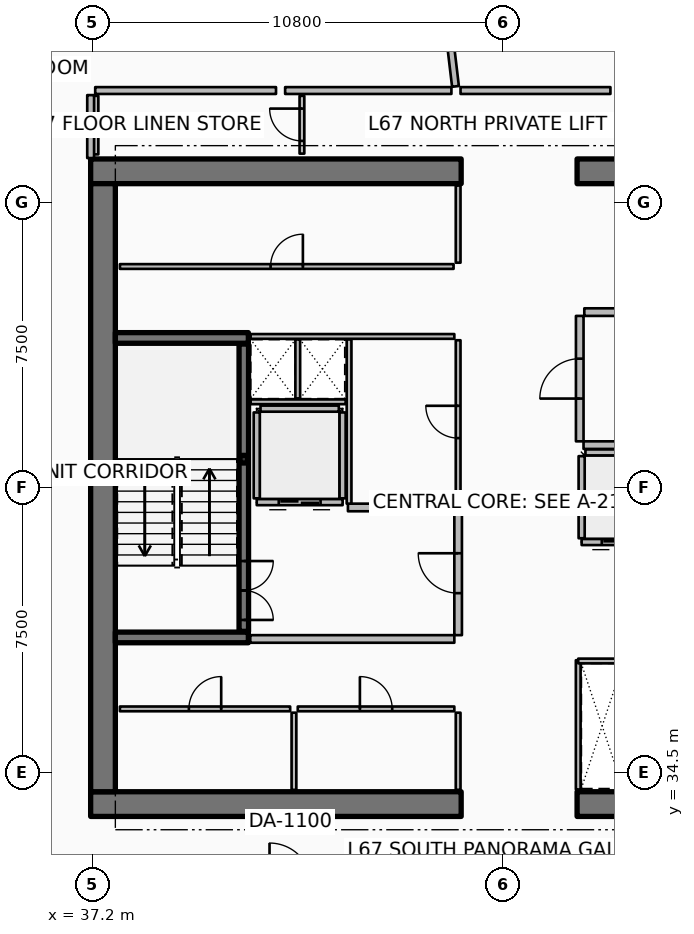
"""IFC4 building model, lengths in metres.
Left out: names, types, materials, properties, quantities, classifications, styles, units other than length and angle.
Written with IfcOpenShell. Run it as: python <this file> out.ifc"""

import sys

from ifc_helpers import new_model, si_unit, direction, frame, frame_2d, origin, origin_2d, place, context, subcontext, project, spatial, rectangle, hollow_rectangle, extrude, element, fill, save


model = new_model("IFC4")
c1 = context("Model", 3, precision=1e-05, world=origin(), true_north=direction((0.0, 1.0)))
c2 = subcontext(c1, "Body", "Model", "MODEL_VIEW")
j1 = project(units=[si_unit("LENGTHUNIT", "METRE"), si_unit("PLANEANGLEUNIT", "RADIAN")], contexts=[c1])
p1 = place(None, origin())
s1 = spatial("IfcSite", under=j1, at=p1, CompositionType="ELEMENT")
p2 = place(p1, origin())
s2 = spatial("IfcBuilding", under=s1, at=p2, CompositionType="ELEMENT")
p3 = place(p2, frame((0.0, 0.0, 267.5)))
s3 = spatial("IfcBuildingStorey", under=s2, at=p3, CompositionType="ELEMENT", Elevation=267.5)
for number, where, z_axis, x_axis in (
    (1, (37.15, 33.675, 0.0), (0.0, 0.0, 1.0), (1.0, 0.0, 0.0)),
    (2, (49.95, 33.675, 0.0), (0.0, 0.0, 1.0), (1.0, 0.0, 0.0)),
    (3, (37.15, 50.325, 0.0), (0.0, 0.0, 1.0), (1.0, 0.0, 0.0)),
    (4, (49.95, 50.325, 0.0), (0.0, 0.0, 1.0), (1.0, 0.0, 0.0)),
):
    element("IfcWall", number, at=place(p3, frame(where, z_axis=z_axis, x_axis=x_axis)), inside=s3, PredefinedType="SHEAR", context=c2, shape_type="SweptSolid", body=[
        extrude(rectangle(XDim=9.75, YDim=0.65, at=frame_2d((4.875, 0.0))), origin(), (0.0, 0.0, 1.0), 3.85),
    ])
p4 = place(p3, frame((37.475, 34.0, 0.0), z_axis=(0.0, 0.0, 1.0), x_axis=(0.0, 1.0, 0.0)))
e5 = element("IfcWall", 5, at=p4, inside=s3, PredefinedType="SHEAR", context=c2, shape_type="SweptSolid", body=[
    extrude(rectangle(XDim=16.0, YDim=0.65, at=frame_2d((8.0, 0.0))), origin(), (0.0, 0.0, 1.0), 3.85),
])
for number, where, z_axis, x_axis in (
    (6, (37.8, 38.06, 0.0), (0.0, 0.0, 1.0), (1.0, 0.0, 0.0)),
    (7, (37.8, 45.94, 0.0), (0.0, 0.0, 1.0), (1.0, 0.0, 0.0)),
):
    element("IfcWall", number, at=place(p3, frame(where, z_axis=z_axis, x_axis=x_axis)), inside=s3, PredefinedType="SHEAR", context=c2, shape_type="SweptSolid", body=[
        extrude(rectangle(XDim=3.5, YDim=0.28, at=frame_2d((1.75, 0.0))), origin(), (0.0, 0.0, 1.0), 3.85),
    ])
p5 = place(p3, frame((41.18, 42.75, 0.0), z_axis=(0.0, 0.0, 1.0), x_axis=(1.0, 0.0, 0.0)))
e8 = element("IfcColumn", 8, at=p5, inside=s3, PredefinedType="COLUMN", context=c2, shape_type="SweptSolid", body=[
    extrude(hollow_rectangle(XDim=0.2, YDim=0.2, WallThickness=0.01, InnerFilletRadius=0.01, OuterFilletRadius=0.02, at=origin_2d()), origin(), (0.0, 0.0, 1.0), 1.72),
])
p6 = place(p3, frame((41.18, 38.22, 0.0), z_axis=(0.0, 0.0, 1.0), x_axis=(0.0, 1.0, 0.0)))
e9 = element("IfcWall", 9, at=p6, inside=s3, PredefinedType="SOLIDWALL", context=c2, shape_type="SweptSolid", body=[
    extrude(rectangle(XDim=7.56, YDim=0.25, at=frame_2d((3.78, 0.0))), origin(), (0.0, 0.0, 1.0), 3.59),
])
p7 = place(p6, frame((0.3, 0.0, 0.0)))
e10 = element("IfcOpeningElement", 10, at=p7, cuts=e9, PredefinedType="OPENING", context=c2, shape_type="SweptSolid", body=[
    extrude(rectangle(XDim=1.55, YDim=2.15, at=frame_2d((0.775, 1.075))), frame((0.0, 0.135, 0.0), z_axis=(0.0, -1.0, 0.0), x_axis=(1.0, 0.0, 0.0)), (0.0, 0.0, 1.0), 0.27),
])
p8 = place(p3, frame((43.78, 41.62, 0.0), z_axis=(0.0, 0.0, 1.0), x_axis=(-1.0, 0.0, 0.0)))
e11 = element("IfcWall", 11, at=p8, inside=s3, PredefinedType="PARTITIONING", context=c2, shape_type="SweptSolid", body=[
    extrude(rectangle(XDim=2.26, YDim=0.16, at=frame_2d((1.13, 0.0))), origin(), (0.0, 0.0, 1.0), 3.59),
])
p9 = place(p8, frame((0.58, 0.0, 0.0)))
e12 = element("IfcOpeningElement", 12, at=p9, cuts=e11, PredefinedType="OPENING", context=c2, shape_type="SweptSolid", body=[
    extrude(rectangle(XDim=1.1, YDim=2.1, at=frame_2d((0.55, 1.05))), frame((0.0, 0.09, 0.0), z_axis=(0.0, -1.0, 0.0), x_axis=(1.0, 0.0, 0.0)), (0.0, 0.0, 1.0), 0.18),
])
for number, where, z_axis, x_axis in (
    (13, (43.78, 41.72, 0.0), (0.0, 0.0, 1.0), (0.0, 1.0, 0.0)),
    (14, (41.52, 41.72, 0.0), (0.0, 0.0, 1.0), (0.0, 1.0, 0.0)),
):
    element("IfcWall", number, at=place(p3, frame(where, z_axis=z_axis, x_axis=x_axis)), inside=s3, PredefinedType="PARTITIONING", context=c2, shape_type="SweptSolid", body=[
        extrude(rectangle(XDim=2.26, YDim=0.16, at=frame_2d((1.13, 0.0))), origin(), (0.0, 0.0, 1.0), 3.59),
    ])
p10 = place(p3, frame((41.62, 44.08, 0.0), z_axis=(0.0, 0.0, 1.0), x_axis=(1.0, 0.0, 0.0)))
e15 = element("IfcWall", 15, at=p10, inside=s3, PredefinedType="PARTITIONING", context=c2, shape_type="SweptSolid", body=[
    extrude(rectangle(XDim=2.06, YDim=0.16, at=frame_2d((1.03, 0.0))), origin(), (0.0, 0.0, 1.0), 3.59),
])
p11 = place(p3, frame((52.23, 40.57, 0.0), z_axis=(0.0, 0.0, 1.0), x_axis=(-1.0, 0.0, 0.0)))
e16 = element("IfcWall", 16, at=p11, inside=s3, PredefinedType="PARTITIONING", context=c2, shape_type="SweptSolid", body=[
    extrude(rectangle(XDim=2.16, YDim=0.16, at=frame_2d((1.08, 0.0))), origin(), (0.0, 0.0, 1.0), 3.59),
])
p12 = place(p11, frame((0.53, 0.0, 0.0)))
e17 = element("IfcOpeningElement", 17, at=p12, cuts=e16, PredefinedType="OPENING", context=c2, shape_type="SweptSolid", body=[
    extrude(rectangle(XDim=1.1, YDim=2.1, at=frame_2d((0.55, 1.05))), frame((0.0, 0.09, 0.0), z_axis=(0.0, -1.0, 0.0), x_axis=(1.0, 0.0, 0.0)), (0.0, 0.0, 1.0), 0.18),
])
p13 = place(p3, frame((50.07, 40.67, 0.0), z_axis=(0.0, 0.0, 1.0), x_axis=(0.0, 1.0, 0.0)))
e18 = element("IfcWall", 18, at=p13, inside=s3, PredefinedType="PARTITIONING", context=c2, shape_type="SweptSolid", body=[
    extrude(rectangle(XDim=2.16, YDim=0.16, at=frame_2d((1.08, 0.0))), origin(), (0.0, 0.0, 1.0), 3.59),
])
p14 = place(p3, frame((50.17, 42.93, 0.0), z_axis=(0.0, 0.0, 1.0), x_axis=(1.0, 0.0, 0.0)))
e19 = element("IfcWall", 19, at=p14, inside=s3, PredefinedType="PARTITIONING", context=c2, shape_type="SweptSolid", body=[
    extrude(rectangle(XDim=1.96, YDim=0.16, at=frame_2d((0.98, 0.0))), origin(), (0.0, 0.0, 1.0), 3.59),
])
for number, where, z_axis, x_axis in (
    (20, (46.82, 34.05, 0.0), (0.0, 0.0, 1.0), (0.0, 1.0, 0.0)),
    (21, (42.5, 34.05, 0.0), (0.0, 0.0, 1.0), (0.0, 1.0, 0.0)),
):
    element("IfcWall", number, at=place(p3, frame(where, z_axis=z_axis, x_axis=x_axis)), inside=s3, PredefinedType="PARTITIONING", context=c2, shape_type="SweptSolid", body=[
        extrude(rectangle(XDim=2.03, YDim=0.125, at=frame_2d((1.015, 0.0))), origin(), (0.0, 0.0, 1.0), 3.03),
    ])
p15 = place(p3, frame((37.92, 36.18, 0.0), z_axis=(0.0, 0.0, 1.0), x_axis=(1.0, 0.0, 0.0)))
e22 = element("IfcWall", 22, at=p15, inside=s3, PredefinedType="PARTITIONING", context=c2, shape_type="SweptSolid", body=[
    extrude(rectangle(XDim=4.48, YDim=0.125, at=frame_2d((2.24, 0.0))), origin(), (0.0, 0.0, 1.0), 3.03),
])
p16 = place(p15, frame((1.815, 0.0, 0.0)))
e23 = element("IfcOpeningElement", 23, at=p16, cuts=e22, PredefinedType="OPENING", context=c2, shape_type="SweptSolid", body=[
    extrude(rectangle(XDim=0.85, YDim=2.06, at=frame_2d((0.425, 1.03))), frame((0.0, 0.073, 0.0), z_axis=(0.0, -1.0, 0.0), x_axis=(1.0, 0.0, 0.0)), (0.0, 0.0, 1.0), 0.145),
])
p17 = place(p3, frame((42.6, 36.18, 0.0), z_axis=(0.0, 0.0, 1.0), x_axis=(1.0, 0.0, 0.0)))
e24 = element("IfcWall", 24, at=p17, inside=s3, PredefinedType="PARTITIONING", context=c2, shape_type="SweptSolid", body=[
    extrude(rectangle(XDim=4.12, YDim=0.125, at=frame_2d((2.06, 0.0))), origin(), (0.0, 0.0, 1.0), 3.03),
])
p18 = place(p17, frame((1.635, 0.0, 0.0)))
e25 = element("IfcOpeningElement", 25, at=p18, cuts=e24, PredefinedType="OPENING", context=c2, shape_type="SweptSolid", body=[
    extrude(rectangle(XDim=0.85, YDim=2.06, at=frame_2d((0.425, 1.03))), frame((0.0, 0.073, 0.0), z_axis=(0.0, -1.0, 0.0), x_axis=(1.0, 0.0, 0.0)), (0.0, 0.0, 1.0), 0.145),
])
p19 = place(p3, frame((46.82, 47.92, 0.0), z_axis=(0.0, 0.0, 1.0), x_axis=(0.0, 1.0, 0.0)))
e26 = element("IfcWall", 26, at=p19, inside=s3, PredefinedType="PARTITIONING", context=c2, shape_type="SweptSolid", body=[
    extrude(rectangle(XDim=2.03, YDim=0.125, at=frame_2d((1.015, 0.0))), origin(), (0.0, 0.0, 1.0), 3.03),
])
p20 = place(p3, frame((37.92, 47.82, 0.0), z_axis=(0.0, 0.0, 1.0), x_axis=(1.0, 0.0, 0.0)))
e27 = element("IfcWall", 27, at=p20, inside=s3, PredefinedType="PARTITIONING", context=c2, shape_type="SweptSolid", body=[
    extrude(rectangle(XDim=8.78, YDim=0.125, at=frame_2d((4.39, 0.0))), origin(), (0.0, 0.0, 1.0), 3.03),
])
p21 = place(p20, frame((3.965, 0.0, 0.0)))
e28 = element("IfcOpeningElement", 28, at=p21, cuts=e27, PredefinedType="OPENING", context=c2, shape_type="SweptSolid", body=[
    extrude(rectangle(XDim=0.85, YDim=2.06, at=frame_2d((0.425, 1.03))), frame((0.0, 0.073, 0.0), z_axis=(0.0, -1.0, 0.0), x_axis=(1.0, 0.0, 0.0)), (0.0, 0.0, 1.0), 0.145),
])
p22 = place(p3, frame((41.35, 38.02, 0.0), z_axis=(0.0, 0.0, 1.0), x_axis=(1.0, 0.0, 0.0)))
e29 = element("IfcWall", 29, at=p22, inside=s3, PredefinedType="PARTITIONING", context=c2, shape_type="SweptSolid", body=[
    extrude(rectangle(XDim=5.37, YDim=0.2, at=frame_2d((2.685, 0.0))), origin(), (0.0, 0.0, 1.0), 3.59),
])
p23 = place(p3, frame((43.92, 41.48, 0.0), z_axis=(0.0, 0.0, 1.0), x_axis=(1.0, 0.0, 0.0)))
e30 = element("IfcWall", 30, at=p23, inside=s3, PredefinedType="PARTITIONING", context=c2, shape_type="SweptSolid", body=[
    extrude(rectangle(XDim=2.8, YDim=0.2, at=frame_2d((1.4, 0.0))), origin(), (0.0, 0.0, 1.0), 3.59),
])
p24 = place(p3, frame((46.82, 38.12, 0.0), z_axis=(0.0, 0.0, 1.0), x_axis=(0.0, 1.0, 0.0)))
e31 = element("IfcWall", 31, at=p24, inside=s3, PredefinedType="PARTITIONING", context=c2, shape_type="SweptSolid", body=[
    extrude(rectangle(XDim=3.26, YDim=0.2, at=frame_2d((1.63, 0.0))), origin(), (0.0, 0.0, 1.0), 3.59),
])
p25 = place(p24, frame((1.105, 0.0, 0.0)))
e32 = element("IfcOpeningElement", 32, at=p25, cuts=e31, PredefinedType="OPENING", context=c2, shape_type="SweptSolid", body=[
    extrude(rectangle(XDim=1.05, YDim=2.1, at=frame_2d((0.525, 1.05))), frame((0.0, 0.11, 0.0), z_axis=(0.0, -1.0, 0.0), x_axis=(1.0, 0.0, 0.0)), (0.0, 0.0, 1.0), 0.22),
])
p26 = place(p3, frame((50.12, 43.12, 0.0), z_axis=(0.0, 0.0, 1.0), x_axis=(1.0, 0.0, 0.0)))
e33 = element("IfcWall", 33, at=p26, inside=s3, PredefinedType="PARTITIONING", context=c2, shape_type="SweptSolid", body=[
    extrude(rectangle(XDim=8.88, YDim=0.2, at=frame_2d((4.44, 0.0))), origin(), (0.0, 0.0, 1.0), 3.59),
])
p27 = place(p3, frame((50.14, 46.62, 0.0), z_axis=(0.0, 0.0, 1.0), x_axis=(1.0, 0.0, 0.0)))
e34 = element("IfcWall", 34, at=p27, inside=s3, PredefinedType="PARTITIONING", context=c2, shape_type="SweptSolid", body=[
    extrude(rectangle(XDim=1.02, YDim=0.2, at=frame_2d((0.51, 0.0))), origin(), (0.0, 0.0, 1.0), 3.59),
])
p28 = place(p3, frame((50.02, 43.22, 0.0), z_axis=(0.0, 0.0, 1.0), x_axis=(0.0, 1.0, 0.0)))
e35 = element("IfcWall", 35, at=p28, inside=s3, PredefinedType="PARTITIONING", context=c2, shape_type="SweptSolid", body=[
    extrude(rectangle(XDim=3.3, YDim=0.2, at=frame_2d((1.65, 0.0))), origin(), (0.0, 0.0, 1.0), 3.59),
])
p29 = place(p28, frame((1.125, 0.0, 0.0)))
e36 = element("IfcOpeningElement", 36, at=p29, cuts=e35, PredefinedType="OPENING", context=c2, shape_type="SweptSolid", body=[
    extrude(rectangle(XDim=1.05, YDim=2.1, at=frame_2d((0.525, 1.05))), frame((0.0, 0.11, 0.0), z_axis=(0.0, -1.0, 0.0), x_axis=(1.0, 0.0, 0.0)), (0.0, 0.0, 1.0), 0.22),
])
p30 = place(p3, frame((41.36, 45.98, 0.0), z_axis=(0.0, 0.0, 1.0), x_axis=(1.0, 0.0, 0.0)))
e37 = element("IfcWall", 37, at=p30, inside=s3, PredefinedType="PARTITIONING", context=c2, shape_type="SweptSolid", body=[
    extrude(rectangle(XDim=5.36, YDim=0.125, at=frame_2d((2.68, 0.0))), origin(), (0.0, 0.0, 1.0), 3.03),
])
p31 = place(p3, frame((41.36, 44.26, 0.0), z_axis=(0.0, 0.0, 1.0), x_axis=(1.0, 0.0, 0.0)))
e38 = element("IfcWall", 38, at=p31, inside=s3, PredefinedType="PARTITIONING", context=c2, shape_type="SweptSolid", body=[
    extrude(rectangle(XDim=2.5, YDim=0.125, at=frame_2d((1.25, 0.0))), origin(), (0.0, 0.0, 1.0), 3.03),
])
p32 = place(p3, frame((42.6, 44.35, 0.0), z_axis=(0.0, 0.0, 1.0), x_axis=(0.0, 1.0, 0.0)))
e39 = element("IfcWall", 39, at=p32, inside=s3, PredefinedType="PARTITIONING", context=c2, shape_type="SweptSolid", body=[
    extrude(rectangle(XDim=1.55, YDim=0.125, at=frame_2d((0.775, 0.0))), origin(), (0.0, 0.0, 1.0), 3.03),
])
p33 = place(p3, frame((49.98, 34.06, 0.0), z_axis=(0.0, 0.0, 1.0), x_axis=(0.0, 1.0, 0.0)))
e40 = element("IfcWall", 40, at=p33, inside=s3, PredefinedType="PARTITIONING", context=c2, shape_type="SweptSolid", body=[
    extrude(rectangle(XDim=3.4, YDim=0.125, at=frame_2d((1.7, 0.0))), origin(), (0.0, 0.0, 1.0), 3.03),
])
p34 = place(p3, frame((49.98, 37.44, 0.0), z_axis=(0.0, 0.0, 1.0), x_axis=(1.0, 0.0, 0.0)))
e41 = element("IfcWall", 41, at=p34, inside=s3, PredefinedType="PARTITIONING", context=c2, shape_type="SweptSolid", body=[
    extrude(rectangle(XDim=1.26, YDim=0.125, at=frame_2d((0.63, 0.0))), origin(), (0.0, 0.0, 1.0), 3.03),
])
p35 = place(p3, frame((43.95, 41.58, 0.0), z_axis=(0.0, 0.0, 1.0), x_axis=(0.0, 1.0, 0.0)))
e42 = element("IfcWall", 42, at=p35, inside=s3, PredefinedType="PARTITIONING", context=c2, shape_type="SweptSolid", body=[
    extrude(rectangle(XDim=4.32, YDim=0.125, at=frame_2d((2.16, 0.0))), origin(), (0.0, 0.0, 1.0), 3.03),
])
p36 = place(p3, frame((46.82, 41.58, 0.0), z_axis=(0.0, 0.0, 1.0), x_axis=(0.0, 1.0, 0.0)))
e43 = element("IfcWall", 43, at=p36, inside=s3, PredefinedType="PARTITIONING", context=c2, shape_type="SweptSolid", body=[
    extrude(rectangle(XDim=4.3, YDim=0.125, at=frame_2d((2.15, 0.0))), origin(), (0.0, 0.0, 1.0), 3.03),
])
p37 = place(p36, frame((1.725, 0.0, 0.0)))
e44 = element("IfcOpeningElement", 44, at=p37, cuts=e43, PredefinedType="OPENING", context=c2, shape_type="SweptSolid", body=[
    extrude(rectangle(XDim=0.85, YDim=2.06, at=frame_2d((0.425, 1.03))), frame((0.0, 0.073, 0.0), z_axis=(0.0, -1.0, 0.0), x_axis=(1.0, 0.0, 0.0)), (0.0, 0.0, 1.0), 0.145),
])
p38 = place(p3, frame((37.29, 50.77, 0.0), z_axis=(0.0, 0.0, 1.0), x_axis=(0.0, 1.0, 0.0)))
e45 = element("IfcWall", 45, at=p38, inside=s3, PredefinedType="PARTITIONING", context=c2, shape_type="SweptSolid", body=[
    extrude(rectangle(XDim=1.54, YDim=0.125, at=frame_2d((0.77, 0.0))), origin(), (0.0, 0.0, 1.0), 3.03),
])
p39 = place(p3, frame((42.71, 50.79, 0.0), z_axis=(0.0, 0.0, 1.0), x_axis=(0.0, 1.0, 0.0)))
e46 = element("IfcWall", 46, at=p39, inside=s3, PredefinedType="PARTITIONING", context=c2, shape_type="SweptSolid", body=[
    extrude(rectangle(XDim=1.52, YDim=0.125, at=frame_2d((0.76, 0.0))), origin(), (0.0, 0.0, 1.0), 2.957),
])
p40 = place(p39, frame((0.335, 0.0, 0.0)))
e47 = element("IfcOpeningElement", 47, at=p40, cuts=e46, PredefinedType="OPENING", context=c2, shape_type="SweptSolid", body=[
    extrude(rectangle(XDim=0.85, YDim=2.06, at=frame_2d((0.425, 1.03))), frame((0.0, 0.073, 0.0), z_axis=(0.0, -1.0, 0.0), x_axis=(1.0, 0.0, 0.0)), (0.0, 0.0, 1.0), 0.145),
])
p41 = place(p3, frame((46.75, 52.559, 0.0), z_axis=(0.0, 0.0, 1.0), x_axis=(-0.117540318076, 0.993068111273, 0.0)))
e48 = element("IfcWall", 48, at=p41, inside=s3, PredefinedType="PARTITIONING", context=c2, shape_type="SweptSolid", body=[
    extrude(rectangle(XDim=14.062, YDim=0.18, at=frame_2d((7.031, 0.0))), origin(), (0.0, 0.0, 1.0), 2.957),
])
p42 = place(p3, frame((46.643, 52.45, 0.0), z_axis=(0.0, 0.0, 1.0), x_axis=(-1.0, 0.0, 0.0)))
e49 = element("IfcWall", 49, at=p42, inside=s3, PredefinedType="PARTITIONING", context=c2, shape_type="SweptSolid", body=[
    extrude(rectangle(XDim=4.376, YDim=0.18, at=frame_2d((2.188, 0.0))), origin(), (0.0, 0.0, 1.0), 2.957),
])
p43 = place(p3, frame((42.028, 52.45, 0.0), z_axis=(0.0, 0.0, 1.0), x_axis=(-1.0, 0.0, 0.0)))
e50 = element("IfcWall", 50, at=p43, inside=s3, PredefinedType="PARTITIONING", context=c2, shape_type="SweptSolid", body=[
    extrude(rectangle(XDim=4.758, YDim=0.18, at=frame_2d((2.379, 0.0))), origin(), (0.0, 0.0, 1.0), 2.957),
])
p44 = place(p3, frame((37.15, 52.33, 0.0), z_axis=(0.0, 0.0, 1.0), x_axis=(0.0, -1.0, 0.0)))
e51 = element("IfcWall", 51, at=p44, inside=s3, PredefinedType="PARTITIONING", context=c2, shape_type="SweptSolid", body=[
    extrude(rectangle(XDim=1.656, YDim=0.18, at=frame_2d((0.828, 0.0))), origin(), (0.0, 0.0, 1.0), 2.957),
])
p45 = place(p3, frame((37.506, 55.822, 0.0), z_axis=(0.0, 0.0, 1.0), x_axis=(-0.715105814901, -0.699016218334, 0.0)))
e52 = element("IfcWall", 52, at=p45, inside=s3, PredefinedType="PARTITIONING", context=c2, shape_type="SweptSolid", body=[
    extrude(rectangle(XDim=4.294, YDim=0.125, at=frame_2d((2.147, 0.0))), origin(), (0.0, 0.0, 1.0), 2.957),
])
p46 = place(p45, frame((1.697, 0.0, 0.0)))
e53 = element("IfcOpeningElement", 53, at=p46, cuts=e52, PredefinedType="OPENING", context=c2, shape_type="SweptSolid", body=[
    extrude(rectangle(XDim=0.9, YDim=2.08, at=frame_2d((0.45, 1.04))), frame((0.0, 0.073, 0.0), z_axis=(0.0, -1.0, 0.0), x_axis=(1.0, 0.0, 0.0)), (0.0, 0.0, 1.0), 0.145),
])
p47 = place(p3, frame((50.827, 52.45, 0.0), z_axis=(0.0, 0.0, 1.0), x_axis=(-1.0, 0.0, 0.0)))
e54 = element("IfcWall", 54, at=p47, inside=s3, PredefinedType="PARTITIONING", context=c2, shape_type="SweptSolid", body=[
    extrude(rectangle(XDim=3.944, YDim=0.18, at=frame_2d((1.972, 0.0))), origin(), (0.0, 0.0, 1.0), 2.957),
])
p48 = place(p7, origin())
e55 = element("IfcDoor", 55, at=p48, inside=s3, OperationType="DOUBLE_DOOR_SINGLE_SWING", PredefinedType="DOOR", context=c2, shape_type="SweptSolid", body=[
    extrude(rectangle(XDim=1.55, YDim=2.15, at=frame_2d((0.775, 1.075))), frame((0.0, 0.025, 0.0), z_axis=(0.0, -1.0, 0.0), x_axis=(1.0, 0.0, 0.0)), (0.0, 0.0, 1.0), 0.05),
])
fill(e10, e55)
p49 = place(p9, origin())
e56 = element("IfcDoor", 56, at=p49, inside=s3, OperationType="DOUBLE_DOOR_SLIDING", PredefinedType="DOOR", context=c2, shape_type="SweptSolid", body=[
    extrude(rectangle(XDim=1.1, YDim=2.1, at=frame_2d((0.55, 1.05))), frame((0.0, 0.025, 0.0), z_axis=(0.0, -1.0, 0.0), x_axis=(1.0, 0.0, 0.0)), (0.0, 0.0, 1.0), 0.05),
])
fill(e12, e56)
p50 = place(p12, origin())
e57 = element("IfcDoor", 57, at=p50, inside=s3, OperationType="DOUBLE_DOOR_SLIDING", PredefinedType="DOOR", context=c2, shape_type="SweptSolid", body=[
    extrude(rectangle(XDim=1.1, YDim=2.1, at=frame_2d((0.55, 1.05))), frame((0.0, 0.025, 0.0), z_axis=(0.0, -1.0, 0.0), x_axis=(1.0, 0.0, 0.0)), (0.0, 0.0, 1.0), 0.05),
])
fill(e17, e57)
p51 = place(p16, origin())
e58 = element("IfcDoor", 58, at=p51, inside=s3, OperationType="SINGLE_SWING_RIGHT", PredefinedType="DOOR", context=c2, shape_type="SweptSolid", body=[
    extrude(rectangle(XDim=0.85, YDim=2.06, at=frame_2d((0.425, 1.03))), frame((0.0, 0.025, 0.0), z_axis=(0.0, -1.0, 0.0), x_axis=(1.0, 0.0, 0.0)), (0.0, 0.0, 1.0), 0.05),
])
fill(e23, e58)
p52 = place(p18, origin())
e59 = element("IfcDoor", 59, at=p52, inside=s3, OperationType="SINGLE_SWING_LEFT", PredefinedType="DOOR", context=c2, shape_type="SweptSolid", body=[
    extrude(rectangle(XDim=0.85, YDim=2.06, at=frame_2d((0.425, 1.03))), frame((0.0, 0.025, 0.0), z_axis=(0.0, -1.0, 0.0), x_axis=(1.0, 0.0, 0.0)), (0.0, 0.0, 1.0), 0.05),
])
fill(e25, e59)
p53 = place(p21, origin())
e60 = element("IfcDoor", 60, at=p53, inside=s3, OperationType="SINGLE_SWING_RIGHT", PredefinedType="DOOR", context=c2, shape_type="SweptSolid", body=[
    extrude(rectangle(XDim=0.85, YDim=2.06, at=frame_2d((0.425, 1.03))), frame((0.0, 0.025, 0.0), z_axis=(0.0, -1.0, 0.0), x_axis=(1.0, 0.0, 0.0)), (0.0, 0.0, 1.0), 0.05),
])
fill(e28, e60)
p54 = place(p25, origin())
e61 = element("IfcDoor", 61, at=p54, inside=s3, OperationType="SINGLE_SWING_RIGHT", PredefinedType="DOOR", context=c2, shape_type="SweptSolid", body=[
    extrude(rectangle(XDim=1.05, YDim=2.1, at=frame_2d((0.525, 1.05))), frame((0.0, 0.025, 0.0), z_axis=(0.0, -1.0, 0.0), x_axis=(1.0, 0.0, 0.0)), (0.0, 0.0, 1.0), 0.05),
])
fill(e32, e61)
p55 = place(p29, origin())
e62 = element("IfcDoor", 62, at=p55, inside=s3, OperationType="SINGLE_SWING_LEFT", PredefinedType="DOOR", context=c2, shape_type="SweptSolid", body=[
    extrude(rectangle(XDim=1.05, YDim=2.1, at=frame_2d((0.525, 1.05))), frame((0.0, 0.025, 0.0), z_axis=(0.0, -1.0, 0.0), x_axis=(1.0, 0.0, 0.0)), (0.0, 0.0, 1.0), 0.05),
])
fill(e36, e62)
p56 = place(p37, origin())
e63 = element("IfcDoor", 63, at=p56, inside=s3, OperationType="SINGLE_SWING_RIGHT", PredefinedType="DOOR", context=c2, shape_type="SweptSolid", body=[
    extrude(rectangle(XDim=0.85, YDim=2.06, at=frame_2d((0.425, 1.03))), frame((0.0, 0.025, 0.0), z_axis=(0.0, -1.0, 0.0), x_axis=(1.0, 0.0, 0.0)), (0.0, 0.0, 1.0), 0.05),
])
fill(e44, e63)
p57 = place(p40, origin())
e64 = element("IfcDoor", 64, at=p57, inside=s3, OperationType="SINGLE_SWING_RIGHT", PredefinedType="DOOR", context=c2, shape_type="SweptSolid", body=[
    extrude(rectangle(XDim=0.85, YDim=2.06, at=frame_2d((0.425, 1.03))), frame((0.0, 0.025, 0.0), z_axis=(0.0, -1.0, 0.0), x_axis=(1.0, 0.0, 0.0)), (0.0, 0.0, 1.0), 0.05),
])
fill(e47, e64)
save(model, sys.argv[1])
